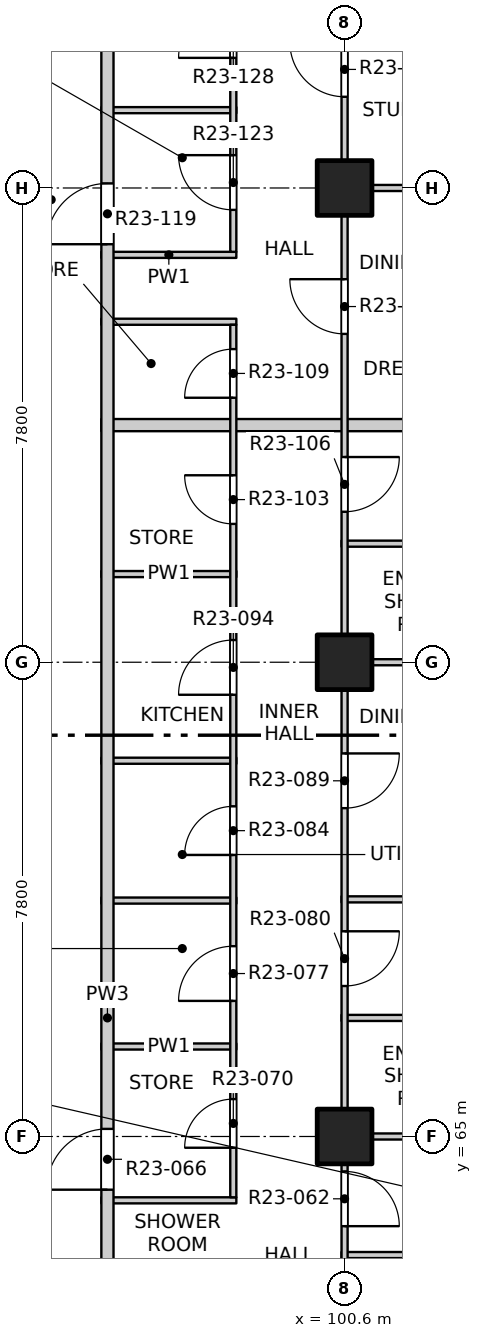
"""IFC4 building model, lengths in metres.
Left out: names, types, materials, properties, quantities, classifications, styles, units other than length and angle.
Written with IfcOpenShell. Run it as: python <this file> out.ifc"""

import sys

from ifc_helpers import new_model, si_unit, direction, frame, frame_2d, origin, origin_2d, place, context, subcontext, project, spatial, rectangle, extrude, element, fill, save


model = new_model("IFC4")
c1 = context("Model", 3, precision=1e-05, world=origin(), true_north=direction((0.0, 1.0)))
c2 = subcontext(c1, "Body", "Model", "MODEL_VIEW")
j1 = project(units=[si_unit("LENGTHUNIT", "METRE"), si_unit("PLANEANGLEUNIT", "RADIAN")], contexts=[c1])
p1 = place(None, origin())
s1 = spatial("IfcSite", under=j1, at=p1, CompositionType="ELEMENT")
p2 = place(p1, origin())
s2 = spatial("IfcBuilding", under=s1, at=p2, CompositionType="ELEMENT")
p3 = place(p2, frame((0.0, 0.0, 234.7)))
s3 = spatial("IfcBuildingStorey", under=s2, at=p3, CompositionType="ELEMENT", Elevation=234.7)
for number, where, z_axis, x_axis in (
    (1, (100.6, 65.0, -0.25), (0.0, 0.0, 1.0), (1.0, 0.0, 0.0)),
    (2, (100.6, 72.8, -0.25), (0.0, 0.0, 1.0), (1.0, 0.0, 0.0)),
    (3, (100.6, 80.6, -0.25), (0.0, 0.0, 1.0), (1.0, 0.0, 0.0)),
):
    element("IfcColumn", number, at=place(p3, frame(where, z_axis=z_axis, x_axis=x_axis)), inside=s3, PredefinedType="COLUMN", context=c2, shape_type="SweptSolid", body=[
        extrude(rectangle(XDim=0.9, YDim=0.9, at=origin_2d()), origin(), (0.0, 0.0, 1.0), 3.4),
    ])
p4 = place(p3, frame((100.55, 63.05, 0.0), z_axis=(0.0, 0.0, 1.0), x_axis=(1.0, 0.0, 0.0)))
e4 = element("IfcWall", 4, at=p4, inside=s3, PredefinedType="PARTITIONING", context=c2, shape_type="SweptSolid", body=[
    extrude(rectangle(XDim=3.4, YDim=0.1, at=frame_2d((1.7, 0.0))), origin(), (0.0, 0.0, 1.0), 3.15),
])
p5 = place(p3, frame((96.6, 63.95, 0.0), z_axis=(0.0, 0.0, 1.0), x_axis=(1.0, 0.0, 0.0)))
e5 = element("IfcWall", 5, at=p5, inside=s3, PredefinedType="PARTITIONING", context=c2, shape_type="SweptSolid", body=[
    extrude(rectangle(XDim=2.22, YDim=0.1, at=frame_2d((1.11, 0.0))), origin(), (0.0, 0.0, 1.0), 3.15),
])
p6 = place(p3, frame((100.55, 65.0, 0.0), z_axis=(0.0, 0.0, 1.0), x_axis=(1.0, 0.0, 0.0)))
e6 = element("IfcWall", 6, at=p6, inside=s3, PredefinedType="PARTITIONING", context=c2, shape_type="SweptSolid", body=[
    extrude(rectangle(XDim=7.55, YDim=0.1, at=frame_2d((3.775, 0.0))), origin(), (0.0, 0.0, 1.0), 3.15),
])
p7 = place(p3, frame((96.6, 66.48, 0.0), z_axis=(0.0, 0.0, 1.0), x_axis=(1.0, 0.0, 0.0)))
e7 = element("IfcWall", 7, at=p7, inside=s3, PredefinedType="PARTITIONING", context=c2, shape_type="SweptSolid", body=[
    extrude(rectangle(XDim=2.22, YDim=0.1, at=frame_2d((1.11, 0.0))), origin(), (0.0, 0.0, 1.0), 3.15),
])
p8 = place(p3, frame((100.55, 66.95, 0.0), z_axis=(0.0, 0.0, 1.0), x_axis=(1.0, 0.0, 0.0)))
e8 = element("IfcWall", 8, at=p8, inside=s3, PredefinedType="PARTITIONING", context=c2, shape_type="SweptSolid", body=[
    extrude(rectangle(XDim=3.4, YDim=0.1, at=frame_2d((1.7, 0.0))), origin(), (0.0, 0.0, 1.0), 3.15),
])
p9 = place(p3, frame((96.6, 68.88, 0.0), z_axis=(0.0, 0.0, 1.0), x_axis=(1.0, 0.0, 0.0)))
e9 = element("IfcWall", 9, at=p9, inside=s3, PredefinedType="PARTITIONING", context=c2, shape_type="SweptSolid", body=[
    extrude(rectangle(XDim=2.22, YDim=0.1, at=frame_2d((1.11, 0.0))), origin(), (0.0, 0.0, 1.0), 2.55),
])
p10 = place(p3, frame((100.55, 68.9, 0.0), z_axis=(0.0, 0.0, 1.0), x_axis=(1.0, 0.0, 0.0)))
e10 = element("IfcWall", 10, at=p10, inside=s3, PredefinedType="PARTITIONING", context=c2, shape_type="SweptSolid", body=[
    extrude(rectangle(XDim=7.55, YDim=0.1, at=frame_2d((3.775, 0.0))), origin(), (0.0, 0.0, 1.0), 2.55),
])
p11 = place(p3, frame((96.6, 71.18, 0.0), z_axis=(0.0, 0.0, 1.0), x_axis=(1.0, 0.0, 0.0)))
e11 = element("IfcWall", 11, at=p11, inside=s3, PredefinedType="PARTITIONING", context=c2, shape_type="SweptSolid", body=[
    extrude(rectangle(XDim=2.22, YDim=0.1, at=frame_2d((1.11, 0.0))), origin(), (0.0, 0.0, 1.0), 3.15),
])
p12 = place(p3, frame((100.55, 72.8, 0.0), z_axis=(0.0, 0.0, 1.0), x_axis=(1.0, 0.0, 0.0)))
e12 = element("IfcWall", 12, at=p12, inside=s3, PredefinedType="PARTITIONING", context=c2, shape_type="SweptSolid", body=[
    extrude(rectangle(XDim=7.55, YDim=0.1, at=frame_2d((3.775, 0.0))), origin(), (0.0, 0.0, 1.0), 3.15),
])
p13 = place(p3, frame((96.6, 74.25, 0.0), z_axis=(0.0, 0.0, 1.0), x_axis=(1.0, 0.0, 0.0)))
e13 = element("IfcWall", 13, at=p13, inside=s3, PredefinedType="PARTITIONING", context=c2, shape_type="SweptSolid", body=[
    extrude(rectangle(XDim=2.22, YDim=0.1, at=frame_2d((1.11, 0.0))), origin(), (0.0, 0.0, 1.0), 3.15),
])
p14 = place(p3, frame((100.55, 74.75, 0.0), z_axis=(0.0, 0.0, 1.0), x_axis=(1.0, 0.0, 0.0)))
e14 = element("IfcWall", 14, at=p14, inside=s3, PredefinedType="PARTITIONING", context=c2, shape_type="SweptSolid", body=[
    extrude(rectangle(XDim=3.4, YDim=0.1, at=frame_2d((1.7, 0.0))), origin(), (0.0, 0.0, 1.0), 3.15),
])
p15 = place(p3, frame((96.6, 76.7, 0.0), z_axis=(0.0, 0.0, 1.0), x_axis=(1.0, 0.0, 0.0)))
e15 = element("IfcWall", 15, at=p15, inside=s3, PredefinedType="PARTITIONING", context=c2, shape_type="SweptSolid", body=[
    extrude(rectangle(XDim=11.5, YDim=0.2, at=frame_2d((5.75, 0.0))), origin(), (0.0, 0.0, 1.0), 2.55),
])
for number, where, z_axis, x_axis in (
    (16, (96.6, 78.4, 0.0), (0.0, 0.0, 1.0), (1.0, 0.0, 0.0)),
    (17, (96.6, 79.5, 0.0), (0.0, 0.0, 1.0), (1.0, 0.0, 0.0)),
):
    element("IfcWall", number, at=place(p3, frame(where, z_axis=z_axis, x_axis=x_axis)), inside=s3, PredefinedType="PARTITIONING", context=c2, shape_type="SweptSolid", body=[
        extrude(rectangle(XDim=2.22, YDim=0.1, at=frame_2d((1.11, 0.0))), origin(), (0.0, 0.0, 1.0), 3.15),
    ])
p16 = place(p3, frame((100.55, 80.6, 0.0), z_axis=(0.0, 0.0, 1.0), x_axis=(1.0, 0.0, 0.0)))
e18 = element("IfcWall", 18, at=p16, inside=s3, PredefinedType="PARTITIONING", context=c2, shape_type="SweptSolid", body=[
    extrude(rectangle(XDim=7.55, YDim=0.1, at=frame_2d((3.775, 0.0))), origin(), (0.0, 0.0, 1.0), 3.15),
])
p17 = place(p3, frame((96.6, 81.88, 0.0), z_axis=(0.0, 0.0, 1.0), x_axis=(1.0, 0.0, 0.0)))
e19 = element("IfcWall", 19, at=p17, inside=s3, PredefinedType="PARTITIONING", context=c2, shape_type="SweptSolid", body=[
    extrude(rectangle(XDim=2.22, YDim=0.1, at=frame_2d((1.11, 0.0))), origin(), (0.0, 0.0, 1.0), 3.15),
])
p18 = place(p3, frame((96.7, 49.5, 0.0), z_axis=(0.0, 0.0, 1.0), x_axis=(0.0, 1.0, 0.0)))
e20 = element("IfcWall", 20, at=p18, inside=s3, PredefinedType="PARTITIONING", context=c2, shape_type="SweptSolid", body=[
    extrude(rectangle(XDim=34.9, YDim=0.2, at=frame_2d((17.45, 0.0))), origin(), (0.0, 0.0, 1.0), 3.15),
])
p19 = place(p18, frame((3.175, 0.0, 0.0)))
e21 = element("IfcOpeningElement", 21, at=p19, cuts=e20, PredefinedType="OPENING", context=c2, shape_type="SweptSolid", body=[
    extrude(rectangle(XDim=1.0, YDim=2.1, at=frame_2d((0.5, 1.05))), frame((0.0, 0.11, 0.0), z_axis=(0.0, -1.0, 0.0), x_axis=(1.0, 0.0, 0.0)), (0.0, 0.0, 1.0), 0.22),
])
p20 = place(p18, frame((14.625, 0.0, 0.0)))
e22 = element("IfcOpeningElement", 22, at=p20, cuts=e20, PredefinedType="OPENING", context=c2, shape_type="SweptSolid", body=[
    extrude(rectangle(XDim=1.0, YDim=2.1, at=frame_2d((0.5, 1.05))), frame((0.0, 0.11, 0.0), z_axis=(0.0, -1.0, 0.0), x_axis=(1.0, 0.0, 0.0)), (0.0, 0.0, 1.0), 0.22),
])
p21 = place(p18, frame((30.175, 0.0, 0.0)))
e23 = element("IfcOpeningElement", 23, at=p21, cuts=e20, PredefinedType="OPENING", context=c2, shape_type="SweptSolid", body=[
    extrude(rectangle(XDim=1.0, YDim=2.1, at=frame_2d((0.5, 1.05))), frame((0.0, 0.11, 0.0), z_axis=(0.0, -1.0, 0.0), x_axis=(1.0, 0.0, 0.0)), (0.0, 0.0, 1.0), 0.22),
])
p22 = place(p3, frame((98.77, 64.0, 0.0), z_axis=(0.0, 0.0, 1.0), x_axis=(0.0, 1.0, 0.0)))
e24 = element("IfcWall", 24, at=p22, inside=s3, PredefinedType="PARTITIONING", context=c2, shape_type="SweptSolid", body=[
    extrude(rectangle(XDim=14.35, YDim=0.1, at=frame_2d((7.175, 0.0))), origin(), (0.0, 0.0, 1.0), 3.15),
])
p23 = place(p22, frame((0.815, 0.0, 0.0)))
e25 = element("IfcOpeningElement", 25, at=p23, cuts=e24, PredefinedType="OPENING", context=c2, shape_type="SweptSolid", body=[
    extrude(rectangle(XDim=0.8, YDim=2.1, at=frame_2d((0.4, 1.05))), frame((0.0, 0.06, 0.0), z_axis=(0.0, -1.0, 0.0), x_axis=(1.0, 0.0, 0.0)), (0.0, 0.0, 1.0), 0.12),
])
p24 = place(p22, frame((3.23, 0.0, 0.0)))
e26 = element("IfcOpeningElement", 26, at=p24, cuts=e24, PredefinedType="OPENING", context=c2, shape_type="SweptSolid", body=[
    extrude(rectangle(XDim=0.9, YDim=2.1, at=frame_2d((0.45, 1.05))), frame((0.0, 0.06, 0.0), z_axis=(0.0, -1.0, 0.0), x_axis=(1.0, 0.0, 0.0)), (0.0, 0.0, 1.0), 0.12),
])
p25 = place(p22, frame((5.63, 0.0, 0.0)))
e27 = element("IfcOpeningElement", 27, at=p25, cuts=e24, PredefinedType="OPENING", context=c2, shape_type="SweptSolid", body=[
    extrude(rectangle(XDim=0.8, YDim=2.1, at=frame_2d((0.4, 1.05))), frame((0.0, 0.06, 0.0), z_axis=(0.0, -1.0, 0.0), x_axis=(1.0, 0.0, 0.0)), (0.0, 0.0, 1.0), 0.12),
])
p26 = place(p22, frame((8.265, 0.0, 0.0)))
e28 = element("IfcOpeningElement", 28, at=p26, cuts=e24, PredefinedType="OPENING", context=c2, shape_type="SweptSolid", body=[
    extrude(rectangle(XDim=0.9, YDim=2.1, at=frame_2d((0.45, 1.05))), frame((0.0, 0.06, 0.0), z_axis=(0.0, -1.0, 0.0), x_axis=(1.0, 0.0, 0.0)), (0.0, 0.0, 1.0), 0.12),
])
p27 = place(p22, frame((11.075, 0.0, 0.0)))
e29 = element("IfcOpeningElement", 29, at=p27, cuts=e24, PredefinedType="OPENING", context=c2, shape_type="SweptSolid", body=[
    extrude(rectangle(XDim=0.8, YDim=2.1, at=frame_2d((0.4, 1.05))), frame((0.0, 0.06, 0.0), z_axis=(0.0, -1.0, 0.0), x_axis=(1.0, 0.0, 0.0)), (0.0, 0.0, 1.0), 0.12),
])
p28 = place(p22, frame((13.15, 0.0, 0.0)))
e30 = element("IfcOpeningElement", 30, at=p28, cuts=e24, PredefinedType="OPENING", context=c2, shape_type="SweptSolid", body=[
    extrude(rectangle(XDim=0.8, YDim=2.1, at=frame_2d((0.4, 1.05))), frame((0.0, 0.06, 0.0), z_axis=(0.0, -1.0, 0.0), x_axis=(1.0, 0.0, 0.0)), (0.0, 0.0, 1.0), 0.12),
])
p29 = place(p3, frame((98.77, 79.55, 0.0), z_axis=(0.0, 0.0, 1.0), x_axis=(0.0, 1.0, 0.0)))
e31 = element("IfcWall", 31, at=p29, inside=s3, PredefinedType="PARTITIONING", context=c2, shape_type="SweptSolid", body=[
    extrude(rectangle(XDim=4.9, YDim=0.1, at=frame_2d((2.45, 0.0))), origin(), (0.0, 0.0, 1.0), 3.15),
])
p30 = place(p29, frame((0.69, 0.0, 0.0)))
e32 = element("IfcOpeningElement", 32, at=p30, cuts=e31, PredefinedType="OPENING", context=c2, shape_type="SweptSolid", body=[
    extrude(rectangle(XDim=0.9, YDim=2.1, at=frame_2d((0.45, 1.05))), frame((0.0, 0.06, 0.0), z_axis=(0.0, -1.0, 0.0), x_axis=(1.0, 0.0, 0.0)), (0.0, 0.0, 1.0), 0.12),
])
p31 = place(p29, frame((3.19, 0.0, 0.0)))
e33 = element("IfcOpeningElement", 33, at=p31, cuts=e31, PredefinedType="OPENING", context=c2, shape_type="SweptSolid", body=[
    extrude(rectangle(XDim=0.9, YDim=2.1, at=frame_2d((0.45, 1.05))), frame((0.0, 0.06, 0.0), z_axis=(0.0, -1.0, 0.0), x_axis=(1.0, 0.0, 0.0)), (0.0, 0.0, 1.0), 0.12),
])
p32 = place(p3, frame((100.6, 41.9, 0.0), z_axis=(0.0, 0.0, 1.0), x_axis=(0.0, 1.0, 0.0)))
e34 = element("IfcWall", 34, at=p32, inside=s3, PredefinedType="PARTITIONING", context=c2, shape_type="SweptSolid", body=[
    extrude(rectangle(XDim=46.2, YDim=0.1, at=frame_2d((23.1, 0.0))), origin(), (0.0, 0.0, 1.0), 3.15),
])
p33 = place(p32, frame((1.2, 0.0, 0.0)))
e35 = element("IfcOpeningElement", 35, at=p33, cuts=e34, PredefinedType="OPENING", context=c2, shape_type="SweptSolid", body=[
    extrude(rectangle(XDim=0.9, YDim=2.1, at=frame_2d((0.45, 1.05))), frame((0.0, 0.06, 0.0), z_axis=(0.0, -1.0, 0.0), x_axis=(1.0, 0.0, 0.0)), (0.0, 0.0, 1.0), 0.12),
])
p34 = place(p32, frame((6.025, 0.0, 0.0)))
e36 = element("IfcOpeningElement", 36, at=p34, cuts=e34, PredefinedType="OPENING", context=c2, shape_type="SweptSolid", body=[
    extrude(rectangle(XDim=0.9, YDim=2.1, at=frame_2d((0.45, 1.05))), frame((0.0, 0.06, 0.0), z_axis=(0.0, -1.0, 0.0), x_axis=(1.0, 0.0, 0.0)), (0.0, 0.0, 1.0), 0.12),
])
p35 = place(p32, frame((9.975, 0.0, 0.0)))
e37 = element("IfcOpeningElement", 37, at=p35, cuts=e34, PredefinedType="OPENING", context=c2, shape_type="SweptSolid", body=[
    extrude(rectangle(XDim=0.9, YDim=2.1, at=frame_2d((0.45, 1.05))), frame((0.0, 0.06, 0.0), z_axis=(0.0, -1.0, 0.0), x_axis=(1.0, 0.0, 0.0)), (0.0, 0.0, 1.0), 0.12),
])
p36 = place(p32, frame((12.9, 0.0, 0.0)))
e38 = element("IfcOpeningElement", 38, at=p36, cuts=e34, PredefinedType="OPENING", context=c2, shape_type="SweptSolid", body=[
    extrude(rectangle(XDim=0.9, YDim=2.1, at=frame_2d((0.45, 1.05))), frame((0.0, 0.06, 0.0), z_axis=(0.0, -1.0, 0.0), x_axis=(1.0, 0.0, 0.0)), (0.0, 0.0, 1.0), 0.12),
])
p37 = place(p32, frame((17.775, 0.0, 0.0)))
e39 = element("IfcOpeningElement", 39, at=p37, cuts=e34, PredefinedType="OPENING", context=c2, shape_type="SweptSolid", body=[
    extrude(rectangle(XDim=0.9, YDim=2.1, at=frame_2d((0.45, 1.05))), frame((0.0, 0.06, 0.0), z_axis=(0.0, -1.0, 0.0), x_axis=(1.0, 0.0, 0.0)), (0.0, 0.0, 1.0), 0.12),
])
p38 = place(p32, frame((21.625, 0.0, 0.0)))
e40 = element("IfcOpeningElement", 40, at=p38, cuts=e34, PredefinedType="OPENING", context=c2, shape_type="SweptSolid", body=[
    extrude(rectangle(XDim=0.9, YDim=2.1, at=frame_2d((0.45, 1.05))), frame((0.0, 0.06, 0.0), z_axis=(0.0, -1.0, 0.0), x_axis=(1.0, 0.0, 0.0)), (0.0, 0.0, 1.0), 0.12),
])
p39 = place(p32, frame((25.575, 0.0, 0.0)))
e41 = element("IfcOpeningElement", 41, at=p39, cuts=e34, PredefinedType="OPENING", context=c2, shape_type="SweptSolid", body=[
    extrude(rectangle(XDim=0.9, YDim=2.1, at=frame_2d((0.45, 1.05))), frame((0.0, 0.06, 0.0), z_axis=(0.0, -1.0, 0.0), x_axis=(1.0, 0.0, 0.0)), (0.0, 0.0, 1.0), 0.12),
])
p40 = place(p32, frame((28.5, 0.0, 0.0)))
e42 = element("IfcOpeningElement", 42, at=p40, cuts=e34, PredefinedType="OPENING", context=c2, shape_type="SweptSolid", body=[
    extrude(rectangle(XDim=0.9, YDim=2.1, at=frame_2d((0.45, 1.05))), frame((0.0, 0.06, 0.0), z_axis=(0.0, -1.0, 0.0), x_axis=(1.0, 0.0, 0.0)), (0.0, 0.0, 1.0), 0.12),
])
p41 = place(p32, frame((33.375, 0.0, 0.0)))
e43 = element("IfcOpeningElement", 43, at=p41, cuts=e34, PredefinedType="OPENING", context=c2, shape_type="SweptSolid", body=[
    extrude(rectangle(XDim=0.9, YDim=2.1, at=frame_2d((0.45, 1.05))), frame((0.0, 0.06, 0.0), z_axis=(0.0, -1.0, 0.0), x_axis=(1.0, 0.0, 0.0)), (0.0, 0.0, 1.0), 0.12),
])
p42 = place(p32, frame((36.3, 0.0, 0.0)))
e44 = element("IfcOpeningElement", 44, at=p42, cuts=e34, PredefinedType="OPENING", context=c2, shape_type="SweptSolid", body=[
    extrude(rectangle(XDim=0.9, YDim=2.1, at=frame_2d((0.45, 1.05))), frame((0.0, 0.06, 0.0), z_axis=(0.0, -1.0, 0.0), x_axis=(1.0, 0.0, 0.0)), (0.0, 0.0, 1.0), 0.12),
])
p43 = place(p32, frame((40.2, 0.0, 0.0)))
e45 = element("IfcOpeningElement", 45, at=p43, cuts=e34, PredefinedType="OPENING", context=c2, shape_type="SweptSolid", body=[
    extrude(rectangle(XDim=0.9, YDim=2.1, at=frame_2d((0.45, 1.05))), frame((0.0, 0.06, 0.0), z_axis=(0.0, -1.0, 0.0), x_axis=(1.0, 0.0, 0.0)), (0.0, 0.0, 1.0), 0.12),
])
p44 = place(p32, frame((44.1, 0.0, 0.0)))
e46 = element("IfcOpeningElement", 46, at=p44, cuts=e34, PredefinedType="OPENING", context=c2, shape_type="SweptSolid", body=[
    extrude(rectangle(XDim=0.9, YDim=2.1, at=frame_2d((0.45, 1.05))), frame((0.0, 0.06, 0.0), z_axis=(0.0, -1.0, 0.0), x_axis=(1.0, 0.0, 0.0)), (0.0, 0.0, 1.0), 0.12),
])
p45 = place(p38, origin())
e47 = element("IfcDoor", 47, at=p45, inside=s3, OperationType="SINGLE_SWING_RIGHT", PredefinedType="DOOR", context=c2, shape_type="SweptSolid", body=[
    extrude(rectangle(XDim=0.9, YDim=2.1, at=frame_2d((0.45, 1.05))), frame((0.0, 0.025, 0.0), z_axis=(0.0, -1.0, 0.0), x_axis=(1.0, 0.0, 0.0)), (0.0, 0.0, 1.0), 0.05),
])
fill(e40, e47)
p46 = place(p20, origin())
e48 = element("IfcDoor", 48, at=p46, inside=s3, OperationType="SINGLE_SWING_LEFT", PredefinedType="DOOR", context=c2, shape_type="SweptSolid", body=[
    extrude(rectangle(XDim=1.0, YDim=2.1, at=frame_2d((0.5, 1.05))), frame((0.0, 0.025, 0.0), z_axis=(0.0, -1.0, 0.0), x_axis=(1.0, 0.0, 0.0)), (0.0, 0.0, 1.0), 0.05),
])
fill(e22, e48)
p47 = place(p23, origin())
e49 = element("IfcDoor", 49, at=p47, inside=s3, OperationType="SINGLE_SWING_LEFT", PredefinedType="DOOR", context=c2, shape_type="SweptSolid", body=[
    extrude(rectangle(XDim=0.8, YDim=2.1, at=frame_2d((0.4, 1.05))), frame((0.0, 0.025, 0.0), z_axis=(0.0, -1.0, 0.0), x_axis=(1.0, 0.0, 0.0)), (0.0, 0.0, 1.0), 0.05),
])
fill(e25, e49)
p48 = place(p24, origin())
e50 = element("IfcDoor", 50, at=p48, inside=s3, OperationType="SINGLE_SWING_LEFT", PredefinedType="DOOR", context=c2, shape_type="SweptSolid", body=[
    extrude(rectangle(XDim=0.9, YDim=2.1, at=frame_2d((0.45, 1.05))), frame((0.0, 0.025, 0.0), z_axis=(0.0, -1.0, 0.0), x_axis=(1.0, 0.0, 0.0)), (0.0, 0.0, 1.0), 0.05),
])
fill(e26, e50)
p49 = place(p39, origin())
e51 = element("IfcDoor", 51, at=p49, inside=s3, OperationType="SINGLE_SWING_LEFT", PredefinedType="DOOR", context=c2, shape_type="SweptSolid", body=[
    extrude(rectangle(XDim=0.9, YDim=2.1, at=frame_2d((0.45, 1.05))), frame((0.0, 0.025, 0.0), z_axis=(0.0, -1.0, 0.0), x_axis=(1.0, 0.0, 0.0)), (0.0, 0.0, 1.0), 0.05),
])
fill(e41, e51)
p50 = place(p25, origin())
e52 = element("IfcDoor", 52, at=p50, inside=s3, OperationType="SINGLE_SWING_LEFT", PredefinedType="DOOR", context=c2, shape_type="SweptSolid", body=[
    extrude(rectangle(XDim=0.8, YDim=2.1, at=frame_2d((0.4, 1.05))), frame((0.0, 0.025, 0.0), z_axis=(0.0, -1.0, 0.0), x_axis=(1.0, 0.0, 0.0)), (0.0, 0.0, 1.0), 0.05),
])
fill(e27, e52)
p51 = place(p40, origin())
e53 = element("IfcDoor", 53, at=p51, inside=s3, OperationType="SINGLE_SWING_LEFT", PredefinedType="DOOR", context=c2, shape_type="SweptSolid", body=[
    extrude(rectangle(XDim=0.9, YDim=2.1, at=frame_2d((0.45, 1.05))), frame((0.0, 0.025, 0.0), z_axis=(0.0, -1.0, 0.0), x_axis=(1.0, 0.0, 0.0)), (0.0, 0.0, 1.0), 0.05),
])
fill(e42, e53)
p52 = place(p26, origin())
e54 = element("IfcDoor", 54, at=p52, inside=s3, OperationType="SINGLE_SWING_LEFT", PredefinedType="DOOR", context=c2, shape_type="SweptSolid", body=[
    extrude(rectangle(XDim=0.9, YDim=2.1, at=frame_2d((0.45, 1.05))), frame((0.0, 0.025, 0.0), z_axis=(0.0, -1.0, 0.0), x_axis=(1.0, 0.0, 0.0)), (0.0, 0.0, 1.0), 0.05),
])
fill(e28, e54)
p53 = place(p27, origin())
e55 = element("IfcDoor", 55, at=p53, inside=s3, OperationType="SINGLE_SWING_RIGHT", PredefinedType="DOOR", context=c2, shape_type="SweptSolid", body=[
    extrude(rectangle(XDim=0.8, YDim=2.1, at=frame_2d((0.4, 1.05))), frame((0.0, 0.025, 0.0), z_axis=(0.0, -1.0, 0.0), x_axis=(1.0, 0.0, 0.0)), (0.0, 0.0, 1.0), 0.05),
])
fill(e29, e55)
p54 = place(p41, origin())
e56 = element("IfcDoor", 56, at=p54, inside=s3, OperationType="SINGLE_SWING_LEFT", PredefinedType="DOOR", context=c2, shape_type="SweptSolid", body=[
    extrude(rectangle(XDim=0.9, YDim=2.1, at=frame_2d((0.45, 1.05))), frame((0.0, 0.025, 0.0), z_axis=(0.0, -1.0, 0.0), x_axis=(1.0, 0.0, 0.0)), (0.0, 0.0, 1.0), 0.05),
])
fill(e43, e56)
p55 = place(p28, origin())
e57 = element("IfcDoor", 57, at=p55, inside=s3, OperationType="SINGLE_SWING_LEFT", PredefinedType="DOOR", context=c2, shape_type="SweptSolid", body=[
    extrude(rectangle(XDim=0.8, YDim=2.1, at=frame_2d((0.4, 1.05))), frame((0.0, 0.025, 0.0), z_axis=(0.0, -1.0, 0.0), x_axis=(1.0, 0.0, 0.0)), (0.0, 0.0, 1.0), 0.05),
])
fill(e30, e57)
p56 = place(p42, origin())
e58 = element("IfcDoor", 58, at=p56, inside=s3, OperationType="SINGLE_SWING_RIGHT", PredefinedType="DOOR", context=c2, shape_type="SweptSolid", body=[
    extrude(rectangle(XDim=0.9, YDim=2.1, at=frame_2d((0.45, 1.05))), frame((0.0, 0.025, 0.0), z_axis=(0.0, -1.0, 0.0), x_axis=(1.0, 0.0, 0.0)), (0.0, 0.0, 1.0), 0.05),
])
fill(e44, e58)
p57 = place(p21, origin())
e59 = element("IfcDoor", 59, at=p57, inside=s3, OperationType="SINGLE_SWING_LEFT", PredefinedType="DOOR", context=c2, shape_type="SweptSolid", body=[
    extrude(rectangle(XDim=1.0, YDim=2.1, at=frame_2d((0.5, 1.05))), frame((0.0, 0.025, 0.0), z_axis=(0.0, -1.0, 0.0), x_axis=(1.0, 0.0, 0.0)), (0.0, 0.0, 1.0), 0.05),
])
fill(e23, e59)
p58 = place(p30, origin())
e60 = element("IfcDoor", 60, at=p58, inside=s3, OperationType="SINGLE_SWING_RIGHT", PredefinedType="DOOR", context=c2, shape_type="SweptSolid", body=[
    extrude(rectangle(XDim=0.9, YDim=2.1, at=frame_2d((0.45, 1.05))), frame((0.0, 0.025, 0.0), z_axis=(0.0, -1.0, 0.0), x_axis=(1.0, 0.0, 0.0)), (0.0, 0.0, 1.0), 0.05),
])
fill(e32, e60)
p59 = place(p43, origin())
e61 = element("IfcDoor", 61, at=p59, inside=s3, OperationType="SINGLE_SWING_RIGHT", PredefinedType="DOOR", context=c2, shape_type="SweptSolid", body=[
    extrude(rectangle(XDim=0.9, YDim=2.1, at=frame_2d((0.45, 1.05))), frame((0.0, 0.025, 0.0), z_axis=(0.0, -1.0, 0.0), x_axis=(1.0, 0.0, 0.0)), (0.0, 0.0, 1.0), 0.05),
])
fill(e45, e61)
p60 = place(p31, origin())
e62 = element("IfcDoor", 62, at=p60, inside=s3, OperationType="SINGLE_SWING_LEFT", PredefinedType="DOOR", context=c2, shape_type="SweptSolid", body=[
    extrude(rectangle(XDim=0.9, YDim=2.1, at=frame_2d((0.45, 1.05))), frame((0.0, 0.025, 0.0), z_axis=(0.0, -1.0, 0.0), x_axis=(1.0, 0.0, 0.0)), (0.0, 0.0, 1.0), 0.05),
])
fill(e33, e62)
save(model, sys.argv[1])
